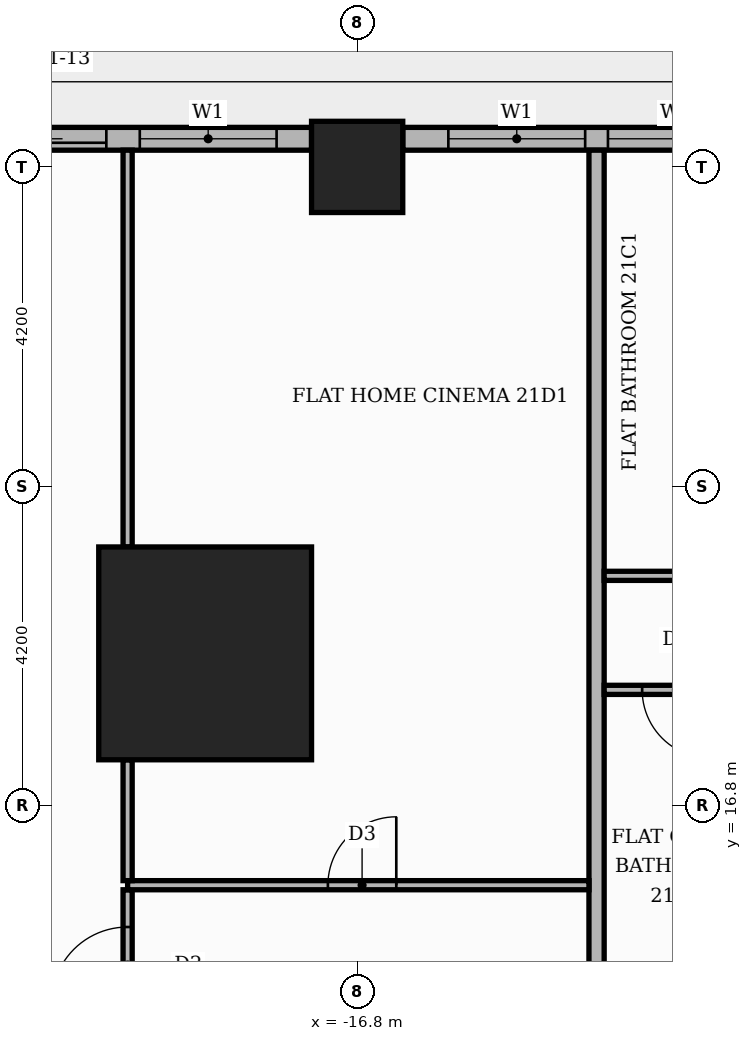
"""IFC4 building model, lengths in metres.
Left out: names, types, materials, properties, quantities, classifications, styles, units other than length and angle.
Written with IfcOpenShell. Run it as: python <this file> out.ifc"""

import sys

from ifc_helpers import new_model, si_unit, direction, frame, frame_2d, origin, origin_2d, place, context, subcontext, project, spatial, rectangle, extrude, element, fill, save


model = new_model("IFC4")
c1 = context("Model", 3, precision=1e-05, world=origin(), true_north=direction((0.0, 1.0)))
c2 = subcontext(c1, "Body", "Model", "MODEL_VIEW")
j1 = project(units=[si_unit("LENGTHUNIT", "METRE"), si_unit("PLANEANGLEUNIT", "RADIAN")], contexts=[c1])
p1 = place(None, origin())
s1 = spatial("IfcSite", under=j1, at=p1, CompositionType="ELEMENT")
p2 = place(p1, origin())
s2 = spatial("IfcBuilding", under=s1, at=p2, CompositionType="ELEMENT")
p3 = place(p2, frame((0.0, 0.0, 90.9)))
s3 = spatial("IfcBuildingStorey", under=s2, at=p3, CompositionType="ELEMENT", Elevation=90.9)
p4 = place(p3, frame((-18.8, 18.8, 0.0), z_axis=(0.0, 0.0, 1.0), x_axis=(1.0, 0.0, 0.0)))
e1 = element("IfcColumn", 1, at=p4, inside=s3, PredefinedType="COLUMN", context=c2, shape_type="SweptSolid", body=[
    extrude(rectangle(XDim=2.8, YDim=2.8, at=origin_2d()), origin(), (0.0, 0.0, 1.0), 3.9),
])
p5 = place(p3, frame((-16.8, 25.2, 0.0), z_axis=(0.0, 0.0, 1.0), x_axis=(1.0, 0.0, 0.0)))
e2 = element("IfcColumn", 2, at=p5, inside=s3, PredefinedType="COLUMN", context=c2, shape_type="SweptSolid", body=[
    extrude(rectangle(XDim=1.2, YDim=1.2, at=origin_2d()), origin(), (0.0, 0.0, 1.0), 3.9),
])
p6 = place(p3, frame((-9.0, 25.57, 0.0), z_axis=(0.0, 0.0, 1.0), x_axis=(-1.0, 0.0, 0.0)))
e3 = element("IfcWall", 3, at=p6, inside=s3, PredefinedType="STANDARD", context=c2, shape_type="SweptSolid", body=[
    extrude(rectangle(XDim=7.2, YDim=0.3, at=frame_2d((3.6, 0.0))), origin(), (0.0, 0.0, 1.0), 3.48),
])
p7 = place(p6, frame((0.6, 0.0, 0.9)))
e4 = element("IfcOpeningElement", 4, at=p7, cuts=e3, PredefinedType="OPENING", context=c2, shape_type="SweptSolid", body=[
    extrude(rectangle(XDim=1.8, YDim=2.1, at=frame_2d((0.9, 1.05))), frame((0.0, 0.16, 0.0), z_axis=(0.0, -1.0, 0.0), x_axis=(1.0, 0.0, 0.0)), (0.0, 0.0, 1.0), 0.32),
])
p8 = place(p6, frame((2.7, 0.0, 0.9)))
e5 = element("IfcOpeningElement", 5, at=p8, cuts=e3, PredefinedType="OPENING", context=c2, shape_type="SweptSolid", body=[
    extrude(rectangle(XDim=1.8, YDim=2.1, at=frame_2d((0.9, 1.05))), frame((0.0, 0.16, 0.0), z_axis=(0.0, -1.0, 0.0), x_axis=(1.0, 0.0, 0.0)), (0.0, 0.0, 1.0), 0.32),
])
p9 = place(p6, frame((4.8, 0.0, 0.9)))
e6 = element("IfcOpeningElement", 6, at=p9, cuts=e3, PredefinedType="OPENING", context=c2, shape_type="SweptSolid", body=[
    extrude(rectangle(XDim=1.8, YDim=2.1, at=frame_2d((0.9, 1.05))), frame((0.0, 0.16, 0.0), z_axis=(0.0, -1.0, 0.0), x_axis=(1.0, 0.0, 0.0)), (0.0, 0.0, 1.0), 0.32),
])
p10 = place(p3, frame((-17.4, 25.57, 0.0), z_axis=(0.0, 0.0, 1.0), x_axis=(-1.0, 0.0, 0.0)))
e7 = element("IfcWall", 7, at=p10, inside=s3, PredefinedType="STANDARD", context=c2, shape_type="SweptSolid", body=[
    extrude(rectangle(XDim=4.82, YDim=0.3, at=frame_2d((2.41, 0.0))), origin(), (0.0, 0.0, 1.0), 3.48),
])
p11 = place(p10, frame((2.7, 0.0, 0.0)))
e8 = element("IfcOpeningElement", 8, at=p11, cuts=e7, PredefinedType="OPENING", context=c2, shape_type="SweptSolid", body=[
    extrude(rectangle(XDim=1.8, YDim=2.4, at=frame_2d((0.9, 1.2))), frame((0.0, 0.16, 0.0), z_axis=(0.0, -1.0, 0.0), x_axis=(1.0, 0.0, 0.0)), (0.0, 0.0, 1.0), 0.32),
])
p12 = place(p10, frame((0.46, 0.0, 0.9)))
e9 = element("IfcOpeningElement", 9, at=p12, cuts=e7, PredefinedType="OPENING", context=c2, shape_type="SweptSolid", body=[
    extrude(rectangle(XDim=1.8, YDim=2.1, at=frame_2d((0.9, 1.05))), frame((0.0, 0.16, 0.0), z_axis=(0.0, -1.0, 0.0), x_axis=(1.0, 0.0, 0.0)), (0.0, 0.0, 1.0), 0.32),
])
p13 = place(p3, frame((-19.82, 13.71, 0.0), z_axis=(0.0, 0.0, 1.0), x_axis=(0.0, 1.0, 0.0)))
e10 = element("IfcWall", 10, at=p13, inside=s3, PredefinedType="PARTITIONING", context=c2, shape_type="SweptSolid", body=[
    extrude(rectangle(XDim=1.98, YDim=0.12, at=frame_2d((0.99, 0.0))), origin(), (0.0, 0.0, 1.0), 3.48),
])
p14 = place(p13, frame((0.49, 0.0, 0.0)))
e11 = element("IfcOpeningElement", 11, at=p14, cuts=e10, PredefinedType="OPENING", context=c2, shape_type="SweptSolid", body=[
    extrude(rectangle(XDim=1.0, YDim=2.1, at=frame_2d((0.5, 1.05))), frame((0.0, 0.07, 0.0), z_axis=(0.0, -1.0, 0.0), x_axis=(1.0, 0.0, 0.0)), (0.0, 0.0, 1.0), 0.14),
])
p15 = place(p3, frame((-13.65, 13.75, 0.0), z_axis=(0.0, 0.0, 1.0), x_axis=(0.0, 1.0, 0.0)))
e12 = element("IfcWall", 12, at=p15, inside=s3, PredefinedType="PARTITIONING", context=c2, shape_type="SweptSolid", body=[
    extrude(rectangle(XDim=11.67, YDim=0.2, at=frame_2d((5.835, 0.0))), origin(), (0.0, 0.0, 1.0), 3.48),
])
p16 = place(p3, frame((-19.82, 15.75, 0.0), z_axis=(0.0, 0.0, 1.0), x_axis=(1.0, 0.0, 0.0)))
e13 = element("IfcWall", 13, at=p16, inside=s3, PredefinedType="PARTITIONING", context=c2, shape_type="SweptSolid", body=[
    extrude(rectangle(XDim=6.07, YDim=0.12, at=frame_2d((3.035, 0.0))), origin(), (0.0, 0.0, 1.0), 3.48),
])
p17 = place(p16, frame((2.635, 0.0, 0.0)))
e14 = element("IfcOpeningElement", 14, at=p17, cuts=e13, PredefinedType="OPENING", context=c2, shape_type="SweptSolid", body=[
    extrude(rectangle(XDim=0.9, YDim=2.1, at=frame_2d((0.45, 1.05))), frame((0.0, 0.07, 0.0), z_axis=(0.0, -1.0, 0.0), x_axis=(1.0, 0.0, 0.0)), (0.0, 0.0, 1.0), 0.14),
])
p18 = place(p3, frame((-19.82, 15.81, 0.0), z_axis=(0.0, 0.0, 1.0), x_axis=(0.0, 1.0, 0.0)))
e15 = element("IfcWall", 15, at=p18, inside=s3, PredefinedType="PARTITIONING", context=c2, shape_type="SweptSolid", body=[
    extrude(rectangle(XDim=1.59, YDim=0.12, at=frame_2d((0.795, 0.0))), origin(), (0.0, 0.0, 1.0), 3.48),
])
p19 = place(p3, frame((-13.55, 18.32, 0.0), z_axis=(0.0, 0.0, 1.0), x_axis=(1.0, 0.0, 0.0)))
e16 = element("IfcWall", 16, at=p19, inside=s3, PredefinedType="PARTITIONING", context=c2, shape_type="SweptSolid", body=[
    extrude(rectangle(XDim=20.9, YDim=0.12, at=frame_2d((10.45, 0.0))), origin(), (0.0, 0.0, 1.0), 3.48),
])
p20 = place(p19, frame((17.525, 0.0, 0.0)))
e17 = element("IfcOpeningElement", 17, at=p20, cuts=e16, PredefinedType="OPENING", context=c2, shape_type="SweptSolid", body=[
    extrude(rectangle(XDim=0.9, YDim=2.1, at=frame_2d((0.45, 1.05))), frame((0.0, 0.07, 0.0), z_axis=(0.0, -1.0, 0.0), x_axis=(1.0, 0.0, 0.0)), (0.0, 0.0, 1.0), 0.14),
])
p21 = place(p19, frame((12.5, 0.0, 0.0)))
e18 = element("IfcOpeningElement", 18, at=p21, cuts=e16, PredefinedType="OPENING", context=c2, shape_type="SweptSolid", body=[
    extrude(rectangle(XDim=0.9, YDim=2.1, at=frame_2d((0.45, 1.05))), frame((0.0, 0.07, 0.0), z_axis=(0.0, -1.0, 0.0), x_axis=(1.0, 0.0, 0.0)), (0.0, 0.0, 1.0), 0.14),
])
p22 = place(p19, frame((7.025, 0.0, 0.0)))
e19 = element("IfcOpeningElement", 19, at=p22, cuts=e16, PredefinedType="OPENING", context=c2, shape_type="SweptSolid", body=[
    extrude(rectangle(XDim=0.9, YDim=2.1, at=frame_2d((0.45, 1.05))), frame((0.0, 0.07, 0.0), z_axis=(0.0, -1.0, 0.0), x_axis=(1.0, 0.0, 0.0)), (0.0, 0.0, 1.0), 0.14),
])
p23 = place(p19, frame((2.6, 0.0, 0.0)))
e20 = element("IfcOpeningElement", 20, at=p23, cuts=e16, PredefinedType="OPENING", context=c2, shape_type="SweptSolid", body=[
    extrude(rectangle(XDim=0.9, YDim=2.1, at=frame_2d((0.45, 1.05))), frame((0.0, 0.07, 0.0), z_axis=(0.0, -1.0, 0.0), x_axis=(1.0, 0.0, 0.0)), (0.0, 0.0, 1.0), 0.14),
])
p24 = place(p19, frame((0.5, 0.0, 0.0)))
e21 = element("IfcOpeningElement", 21, at=p24, cuts=e16, PredefinedType="OPENING", context=c2, shape_type="SweptSolid", body=[
    extrude(rectangle(XDim=0.9, YDim=2.1, at=frame_2d((0.45, 1.05))), frame((0.0, 0.07, 0.0), z_axis=(0.0, -1.0, 0.0), x_axis=(1.0, 0.0, 0.0)), (0.0, 0.0, 1.0), 0.14),
])
p25 = place(p3, frame((-13.55, 19.82, 0.0), z_axis=(0.0, 0.0, 1.0), x_axis=(1.0, 0.0, 0.0)))
e22 = element("IfcWall", 22, at=p25, inside=s3, PredefinedType="PARTITIONING", context=c2, shape_type="SweptSolid", body=[
    extrude(rectangle(XDim=30.95, YDim=0.12, at=frame_2d((15.475, 0.0))), origin(), (0.0, 0.0, 1.0), 3.48),
])
p26 = place(p25, frame((25.65, 0.0, 0.0)))
e23 = element("IfcOpeningElement", 23, at=p26, cuts=e22, PredefinedType="OPENING", context=c2, shape_type="SweptSolid", body=[
    extrude(rectangle(XDim=1.0, YDim=2.1, at=frame_2d((0.5, 1.05))), frame((0.0, 0.07, 0.0), z_axis=(0.0, -1.0, 0.0), x_axis=(1.0, 0.0, 0.0)), (0.0, 0.0, 1.0), 0.14),
])
p27 = place(p25, frame((20.4, 0.0, 0.0)))
e24 = element("IfcOpeningElement", 24, at=p27, cuts=e22, PredefinedType="OPENING", context=c2, shape_type="SweptSolid", body=[
    extrude(rectangle(XDim=1.0, YDim=2.1, at=frame_2d((0.5, 1.05))), frame((0.0, 0.07, 0.0), z_axis=(0.0, -1.0, 0.0), x_axis=(1.0, 0.0, 0.0)), (0.0, 0.0, 1.0), 0.14),
])
p28 = place(p25, frame((13.1, 0.0, 0.0)))
e25 = element("IfcOpeningElement", 25, at=p28, cuts=e22, PredefinedType="OPENING", context=c2, shape_type="SweptSolid", body=[
    extrude(rectangle(XDim=0.9, YDim=2.1, at=frame_2d((0.45, 1.05))), frame((0.0, 0.07, 0.0), z_axis=(0.0, -1.0, 0.0), x_axis=(1.0, 0.0, 0.0)), (0.0, 0.0, 1.0), 0.14),
])
p29 = place(p25, frame((3.65, 0.0, 0.0)))
e26 = element("IfcOpeningElement", 26, at=p29, cuts=e22, PredefinedType="OPENING", context=c2, shape_type="SweptSolid", body=[
    extrude(rectangle(XDim=0.9, YDim=2.1, at=frame_2d((0.45, 1.05))), frame((0.0, 0.07, 0.0), z_axis=(0.0, -1.0, 0.0), x_axis=(1.0, 0.0, 0.0)), (0.0, 0.0, 1.0), 0.14),
])
p30 = place(p3, frame((-19.82, 20.2, 0.0), z_axis=(0.0, 0.0, 1.0), x_axis=(0.0, 1.0, 0.0)))
e27 = element("IfcWall", 27, at=p30, inside=s3, PredefinedType="PARTITIONING", context=c2, shape_type="SweptSolid", body=[
    extrude(rectangle(XDim=5.22, YDim=0.12, at=frame_2d((2.61, 0.0))), origin(), (0.0, 0.0, 1.0), 3.48),
])
p31 = place(p8, origin())
e28 = element("IfcWindow", 28, at=p31, inside=s3, PartitioningType="SINGLE_PANEL", PredefinedType="WINDOW", context=c2, shape_type="SweptSolid", body=[
    extrude(rectangle(XDim=1.8, YDim=2.1, at=frame_2d((0.9, 1.05))), frame((0.0, 0.03, 0.0), z_axis=(0.0, -1.0, 0.0), x_axis=(1.0, 0.0, 0.0)), (0.0, 0.0, 1.0), 0.06),
])
fill(e5, e28)
p32 = place(p9, origin())
e29 = element("IfcWindow", 29, at=p32, inside=s3, PartitioningType="SINGLE_PANEL", PredefinedType="WINDOW", context=c2, shape_type="SweptSolid", body=[
    extrude(rectangle(XDim=1.8, YDim=2.1, at=frame_2d((0.9, 1.05))), frame((0.0, 0.03, 0.0), z_axis=(0.0, -1.0, 0.0), x_axis=(1.0, 0.0, 0.0)), (0.0, 0.0, 1.0), 0.06),
])
fill(e6, e29)
p33 = place(p11, origin())
e30 = element("IfcDoor", 30, at=p33, inside=s3, OperationType="SLIDING_TO_LEFT", PredefinedType="DOOR", context=c2, shape_type="SweptSolid", body=[
    extrude(rectangle(XDim=1.8, YDim=2.4, at=frame_2d((0.9, 1.2))), frame((0.0, 0.025, 0.0), z_axis=(0.0, -1.0, 0.0), x_axis=(1.0, 0.0, 0.0)), (0.0, 0.0, 1.0), 0.05),
])
fill(e8, e30)
p34 = place(p12, origin())
e31 = element("IfcWindow", 31, at=p34, inside=s3, PartitioningType="SINGLE_PANEL", PredefinedType="WINDOW", context=c2, shape_type="SweptSolid", body=[
    extrude(rectangle(XDim=1.8, YDim=2.1, at=frame_2d((0.9, 1.05))), frame((0.0, 0.03, 0.0), z_axis=(0.0, -1.0, 0.0), x_axis=(1.0, 0.0, 0.0)), (0.0, 0.0, 1.0), 0.06),
])
fill(e9, e31)
p35 = place(p24, frame((0.9, 0.0, 0.0), z_axis=(0.0, 0.0, 1.0), x_axis=(-1.0, 0.0, 0.0)))
e32 = element("IfcDoor", 32, at=p35, inside=s3, OperationType="SINGLE_SWING_RIGHT", PredefinedType="DOOR", context=c2, shape_type="SweptSolid", body=[
    extrude(rectangle(XDim=0.9, YDim=2.1, at=frame_2d((0.45, 1.05))), frame((0.0, 0.025, 0.0), z_axis=(0.0, -1.0, 0.0), x_axis=(1.0, 0.0, 0.0)), (0.0, 0.0, 1.0), 0.05),
])
fill(e21, e32)
p36 = place(p17, origin())
e33 = element("IfcDoor", 33, at=p36, inside=s3, OperationType="SINGLE_SWING_RIGHT", PredefinedType="DOOR", context=c2, shape_type="SweptSolid", body=[
    extrude(rectangle(XDim=0.9, YDim=2.1, at=frame_2d((0.45, 1.05))), frame((0.0, 0.025, 0.0), z_axis=(0.0, -1.0, 0.0), x_axis=(1.0, 0.0, 0.0)), (0.0, 0.0, 1.0), 0.05),
])
fill(e14, e33)
p37 = place(p14, origin())
e34 = element("IfcDoor", 34, at=p37, inside=s3, OperationType="SINGLE_SWING_LEFT", PredefinedType="DOOR", context=c2, shape_type="SweptSolid", body=[
    extrude(rectangle(XDim=1.0, YDim=2.1, at=frame_2d((0.5, 1.05))), frame((0.0, 0.025, 0.0), z_axis=(0.0, -1.0, 0.0), x_axis=(1.0, 0.0, 0.0)), (0.0, 0.0, 1.0), 0.05),
])
fill(e11, e34)
save(model, sys.argv[1])
